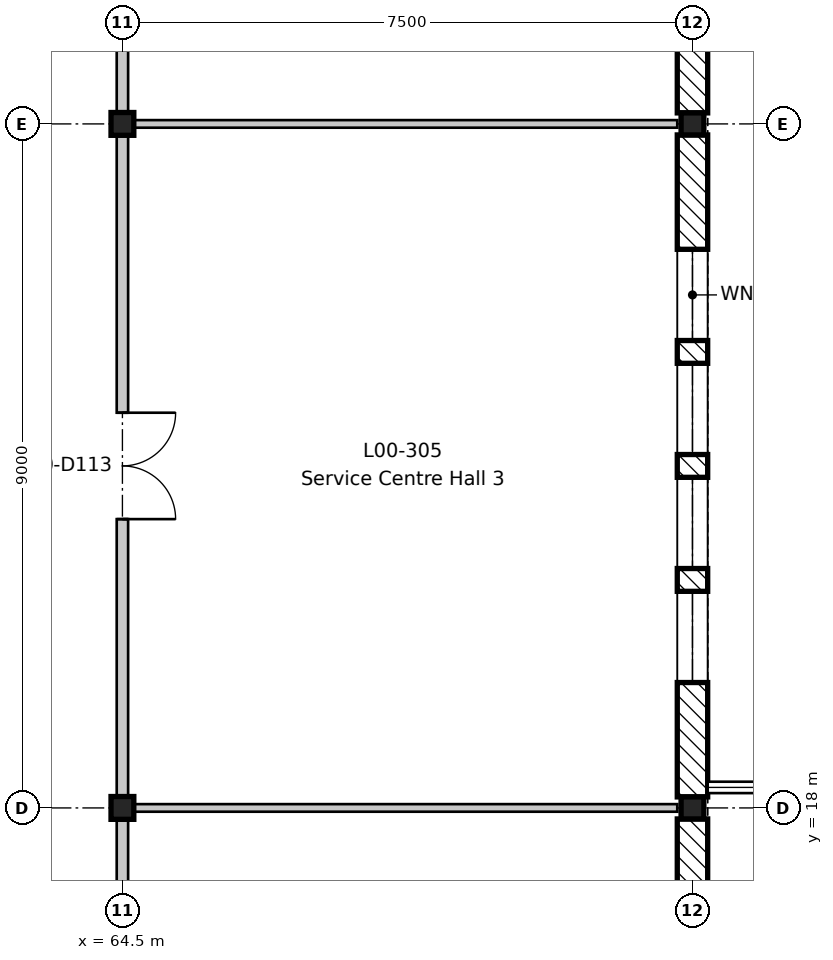
"""IFC4 building model, lengths in metres.
Left out: names, types, materials, properties, quantities, classifications, styles, units other than length and angle.
Written with IfcOpenShell. Run it as: python <this file> out.ifc"""

import sys

from ifc_helpers import new_model, si_unit, direction, frame, frame_2d, origin, origin_2d, place, context, subcontext, project, spatial, rectangle, i_section, extrude, element, fill, save


model = new_model("IFC4")
c1 = context("Model", 3, precision=1e-05, world=origin(), true_north=direction((0.0, 1.0)))
c2 = subcontext(c1, "Body", "Model", "MODEL_VIEW")
j1 = project(units=[si_unit("LENGTHUNIT", "METRE"), si_unit("PLANEANGLEUNIT", "RADIAN")], contexts=[c1])
p1 = place(None, origin())
s1 = spatial("IfcSite", under=j1, at=p1, CompositionType="ELEMENT")
p2 = place(p1, origin())
s2 = spatial("IfcBuilding", under=s1, at=p2, CompositionType="ELEMENT")
p3 = place(p2, origin())
s3 = spatial("IfcBuildingStorey", under=s2, at=p3, CompositionType="ELEMENT", Elevation=0.0)
for number, where, z_axis, x_axis in (
    (1, (64.5, 18.0, -0.6), (0.0, 0.0, 1.0), (1.0, 0.0, 0.0)),
    (2, (64.5, 27.0, -0.6), (0.0, 0.0, 1.0), (1.0, 0.0, 0.0)),
):
    element("IfcColumn", number, at=place(p3, frame(where, z_axis=z_axis, x_axis=x_axis)), inside=s3, PredefinedType="COLUMN", context=c2, shape_type="SweptSolid", body=[
        extrude(i_section(OverallWidth=0.3, OverallDepth=0.3, WebThickness=0.011, FlangeThickness=0.019, FilletRadius=0.027, at=origin_2d()), origin(), (0.0, 0.0, 1.0), 5.8),
    ])
for number, where, z_axis, x_axis in (
    (3, (72.0, 18.0, -0.6), (0.0, 0.0, 1.0), (1.0, 0.0, 0.0)),
    (4, (72.0, 27.0, -0.6), (0.0, 0.0, 1.0), (1.0, 0.0, 0.0)),
):
    element("IfcColumn", number, at=place(p3, frame(where, z_axis=z_axis, x_axis=x_axis)), inside=s3, PredefinedType="COLUMN", context=c2, shape_type="SweptSolid", body=[
        extrude(i_section(OverallWidth=0.3, OverallDepth=0.29, WebThickness=0.009, FlangeThickness=0.014, FilletRadius=0.027, at=origin_2d()), origin(), (0.0, 0.0, 1.0), 5.8),
    ])
p4 = place(p3, frame((72.0, 17.855, 0.0), z_axis=(0.0, 0.0, 1.0), x_axis=(0.0, -1.0, 0.0)))
e5 = element("IfcWall", 5, at=p4, inside=s3, PredefinedType="STANDARD", context=c2, shape_type="SweptSolid", body=[
    extrude(rectangle(XDim=8.71, YDim=0.4, at=frame_2d((4.355, 0.0))), origin(), (0.0, 0.0, 1.0), 4.8),
])
p5 = place(p4, frame((6.005, 0.0, 0.6)))
e6 = element("IfcOpeningElement", 6, at=p5, cuts=e5, PredefinedType="OPENING", context=c2, shape_type="SweptSolid", body=[
    extrude(rectangle(XDim=1.2, YDim=3.9, at=frame_2d((0.6, 1.95))), frame((0.0, 0.21, 0.0), z_axis=(0.0, -1.0, 0.0), x_axis=(1.0, 0.0, 0.0)), (0.0, 0.0, 1.0), 0.42),
])
p6 = place(p4, frame((4.505, 0.0, 0.6)))
e7 = element("IfcOpeningElement", 7, at=p6, cuts=e5, PredefinedType="OPENING", context=c2, shape_type="SweptSolid", body=[
    extrude(rectangle(XDim=1.2, YDim=3.9, at=frame_2d((0.6, 1.95))), frame((0.0, 0.21, 0.0), z_axis=(0.0, -1.0, 0.0), x_axis=(1.0, 0.0, 0.0)), (0.0, 0.0, 1.0), 0.42),
])
p7 = place(p4, frame((3.005, 0.0, 0.6)))
e8 = element("IfcOpeningElement", 8, at=p7, cuts=e5, PredefinedType="OPENING", context=c2, shape_type="SweptSolid", body=[
    extrude(rectangle(XDim=1.2, YDim=3.9, at=frame_2d((0.6, 1.95))), frame((0.0, 0.21, 0.0), z_axis=(0.0, -1.0, 0.0), x_axis=(1.0, 0.0, 0.0)), (0.0, 0.0, 1.0), 0.42),
])
p8 = place(p4, frame((1.505, 0.0, 0.6)))
e9 = element("IfcOpeningElement", 9, at=p8, cuts=e5, PredefinedType="OPENING", context=c2, shape_type="SweptSolid", body=[
    extrude(rectangle(XDim=1.2, YDim=3.9, at=frame_2d((0.6, 1.95))), frame((0.0, 0.21, 0.0), z_axis=(0.0, -1.0, 0.0), x_axis=(1.0, 0.0, 0.0)), (0.0, 0.0, 1.0), 0.42),
])
p9 = place(p3, frame((72.0, 26.855, 0.0), z_axis=(0.0, 0.0, 1.0), x_axis=(0.0, -1.0, 0.0)))
e10 = element("IfcWall", 10, at=p9, inside=s3, PredefinedType="STANDARD", context=c2, shape_type="SweptSolid", body=[
    extrude(rectangle(XDim=8.71, YDim=0.4, at=frame_2d((4.355, 0.0))), origin(), (0.0, 0.0, 1.0), 4.8),
])
p10 = place(p9, frame((6.005, 0.0, 0.6)))
e11 = element("IfcOpeningElement", 11, at=p10, cuts=e10, PredefinedType="OPENING", context=c2, shape_type="SweptSolid", body=[
    extrude(rectangle(XDim=1.2, YDim=3.9, at=frame_2d((0.6, 1.95))), frame((0.0, 0.21, 0.0), z_axis=(0.0, -1.0, 0.0), x_axis=(1.0, 0.0, 0.0)), (0.0, 0.0, 1.0), 0.42),
])
p11 = place(p9, frame((4.505, 0.0, 0.6)))
e12 = element("IfcOpeningElement", 12, at=p11, cuts=e10, PredefinedType="OPENING", context=c2, shape_type="SweptSolid", body=[
    extrude(rectangle(XDim=1.2, YDim=3.9, at=frame_2d((0.6, 1.95))), frame((0.0, 0.21, 0.0), z_axis=(0.0, -1.0, 0.0), x_axis=(1.0, 0.0, 0.0)), (0.0, 0.0, 1.0), 0.42),
])
p12 = place(p9, frame((3.005, 0.0, 0.6)))
e13 = element("IfcOpeningElement", 13, at=p12, cuts=e10, PredefinedType="OPENING", context=c2, shape_type="SweptSolid", body=[
    extrude(rectangle(XDim=1.2, YDim=3.9, at=frame_2d((0.6, 1.95))), frame((0.0, 0.21, 0.0), z_axis=(0.0, -1.0, 0.0), x_axis=(1.0, 0.0, 0.0)), (0.0, 0.0, 1.0), 0.42),
])
p13 = place(p9, frame((1.505, 0.0, 0.6)))
e14 = element("IfcOpeningElement", 14, at=p13, cuts=e10, PredefinedType="OPENING", context=c2, shape_type="SweptSolid", body=[
    extrude(rectangle(XDim=1.2, YDim=3.9, at=frame_2d((0.6, 1.95))), frame((0.0, 0.21, 0.0), z_axis=(0.0, -1.0, 0.0), x_axis=(1.0, 0.0, 0.0)), (0.0, 0.0, 1.0), 0.42),
])
p14 = place(p3, frame((72.0, 35.855, 0.0), z_axis=(0.0, 0.0, 1.0), x_axis=(0.0, -1.0, 0.0)))
e15 = element("IfcWall", 15, at=p14, inside=s3, PredefinedType="STANDARD", context=c2, shape_type="SweptSolid", body=[
    extrude(rectangle(XDim=8.71, YDim=0.4, at=frame_2d((4.355, 0.0))), origin(), (0.0, 0.0, 1.0), 4.8),
])
p15 = place(p14, frame((6.005, 0.0, 0.6)))
e16 = element("IfcOpeningElement", 16, at=p15, cuts=e15, PredefinedType="OPENING", context=c2, shape_type="SweptSolid", body=[
    extrude(rectangle(XDim=1.2, YDim=3.9, at=frame_2d((0.6, 1.95))), frame((0.0, 0.21, 0.0), z_axis=(0.0, -1.0, 0.0), x_axis=(1.0, 0.0, 0.0)), (0.0, 0.0, 1.0), 0.42),
])
p16 = place(p14, frame((4.505, 0.0, 0.6)))
e17 = element("IfcOpeningElement", 17, at=p16, cuts=e15, PredefinedType="OPENING", context=c2, shape_type="SweptSolid", body=[
    extrude(rectangle(XDim=1.2, YDim=3.9, at=frame_2d((0.6, 1.95))), frame((0.0, 0.21, 0.0), z_axis=(0.0, -1.0, 0.0), x_axis=(1.0, 0.0, 0.0)), (0.0, 0.0, 1.0), 0.42),
])
p17 = place(p14, frame((3.005, 0.0, 0.6)))
e18 = element("IfcOpeningElement", 18, at=p17, cuts=e15, PredefinedType="OPENING", context=c2, shape_type="SweptSolid", body=[
    extrude(rectangle(XDim=1.2, YDim=3.9, at=frame_2d((0.6, 1.95))), frame((0.0, 0.21, 0.0), z_axis=(0.0, -1.0, 0.0), x_axis=(1.0, 0.0, 0.0)), (0.0, 0.0, 1.0), 0.42),
])
p18 = place(p14, frame((1.505, 0.0, 0.6)))
e19 = element("IfcOpeningElement", 19, at=p18, cuts=e15, PredefinedType="OPENING", context=c2, shape_type="SweptSolid", body=[
    extrude(rectangle(XDim=1.2, YDim=3.9, at=frame_2d((0.6, 1.95))), frame((0.0, 0.21, 0.0), z_axis=(0.0, -1.0, 0.0), x_axis=(1.0, 0.0, 0.0)), (0.0, 0.0, 1.0), 0.42),
])
for number, where, z_axis, x_axis in (
    (20, (64.575, 18.0, 0.0), (0.0, 0.0, 1.0), (1.0, 0.0, 0.0)),
    (21, (64.575, 27.0, 0.0), (0.0, 0.0, 1.0), (1.0, 0.0, 0.0)),
):
    element("IfcWall", number, at=place(p3, frame(where, z_axis=z_axis, x_axis=x_axis)), inside=s3, PredefinedType="PARTITIONING", context=c2, shape_type="SweptSolid", body=[
        extrude(rectangle(XDim=7.225, YDim=0.1, at=frame_2d((3.613, 0.0))), origin(), (0.0, 0.0, 1.0), 4.85),
    ])
p19 = place(p3, frame((64.5, 9.0, 0.0), z_axis=(0.0, 0.0, 1.0), x_axis=(0.0, 1.0, 0.0)))
e22 = element("IfcWall", 22, at=p19, inside=s3, PredefinedType="PARTITIONING", context=c2, shape_type="SweptSolid", body=[
    extrude(rectangle(XDim=44.8, YDim=0.15, at=frame_2d((22.4, 0.0))), origin(), (0.0, 0.0, 1.0), 4.68),
])
p20 = place(p19, frame((3.8, 0.0, 0.0)))
e23 = element("IfcOpeningElement", 23, at=p20, cuts=e22, PredefinedType="OPENING", context=c2, shape_type="SweptSolid", body=[
    extrude(rectangle(XDim=1.4, YDim=2.1, at=frame_2d((0.7, 1.05))), frame((0.0, 0.085, 0.0), z_axis=(0.0, -1.0, 0.0), x_axis=(1.0, 0.0, 0.0)), (0.0, 0.0, 1.0), 0.17),
])
p21 = place(p19, frame((12.8, 0.0, 0.0)))
e24 = element("IfcOpeningElement", 24, at=p21, cuts=e22, PredefinedType="OPENING", context=c2, shape_type="SweptSolid", body=[
    extrude(rectangle(XDim=1.4, YDim=2.1, at=frame_2d((0.7, 1.05))), frame((0.0, 0.085, 0.0), z_axis=(0.0, -1.0, 0.0), x_axis=(1.0, 0.0, 0.0)), (0.0, 0.0, 1.0), 0.17),
])
p22 = place(p19, frame((21.8, 0.0, 0.0)))
e25 = element("IfcOpeningElement", 25, at=p22, cuts=e22, PredefinedType="OPENING", context=c2, shape_type="SweptSolid", body=[
    extrude(rectangle(XDim=1.4, YDim=2.1, at=frame_2d((0.7, 1.05))), frame((0.0, 0.085, 0.0), z_axis=(0.0, -1.0, 0.0), x_axis=(1.0, 0.0, 0.0)), (0.0, 0.0, 1.0), 0.17),
])
p23 = place(p19, frame((30.8, 0.0, 0.0)))
e26 = element("IfcOpeningElement", 26, at=p23, cuts=e22, PredefinedType="OPENING", context=c2, shape_type="SweptSolid", body=[
    extrude(rectangle(XDim=1.4, YDim=2.1, at=frame_2d((0.7, 1.05))), frame((0.0, 0.085, 0.0), z_axis=(0.0, -1.0, 0.0), x_axis=(1.0, 0.0, 0.0)), (0.0, 0.0, 1.0), 0.17),
])
p24 = place(p19, frame((39.8, 0.0, 0.0)))
e27 = element("IfcOpeningElement", 27, at=p24, cuts=e22, PredefinedType="OPENING", context=c2, shape_type="SweptSolid", body=[
    extrude(rectangle(XDim=1.4, YDim=2.1, at=frame_2d((0.7, 1.05))), frame((0.0, 0.085, 0.0), z_axis=(0.0, -1.0, 0.0), x_axis=(1.0, 0.0, 0.0)), (0.0, 0.0, 1.0), 0.17),
])
p25 = place(p10, origin())
e28 = element("IfcWindow", 28, at=p25, inside=s3, PartitioningType="SINGLE_PANEL", PredefinedType="WINDOW", context=c2, shape_type="SweptSolid", body=[
    extrude(rectangle(XDim=1.2, YDim=3.9, at=frame_2d((0.6, 1.95))), frame((0.0, 0.03, 0.0), z_axis=(0.0, -1.0, 0.0), x_axis=(1.0, 0.0, 0.0)), (0.0, 0.0, 1.0), 0.06),
])
fill(e11, e28)
p26 = place(p11, origin())
e29 = element("IfcWindow", 29, at=p26, inside=s3, PartitioningType="SINGLE_PANEL", PredefinedType="WINDOW", context=c2, shape_type="SweptSolid", body=[
    extrude(rectangle(XDim=1.2, YDim=3.9, at=frame_2d((0.6, 1.95))), frame((0.0, 0.03, 0.0), z_axis=(0.0, -1.0, 0.0), x_axis=(1.0, 0.0, 0.0)), (0.0, 0.0, 1.0), 0.06),
])
fill(e12, e29)
p27 = place(p12, origin())
e30 = element("IfcWindow", 30, at=p27, inside=s3, PartitioningType="SINGLE_PANEL", PredefinedType="WINDOW", context=c2, shape_type="SweptSolid", body=[
    extrude(rectangle(XDim=1.2, YDim=3.9, at=frame_2d((0.6, 1.95))), frame((0.0, 0.03, 0.0), z_axis=(0.0, -1.0, 0.0), x_axis=(1.0, 0.0, 0.0)), (0.0, 0.0, 1.0), 0.06),
])
fill(e13, e30)
p28 = place(p13, origin())
e31 = element("IfcWindow", 31, at=p28, inside=s3, PartitioningType="SINGLE_PANEL", PredefinedType="WINDOW", context=c2, shape_type="SweptSolid", body=[
    extrude(rectangle(XDim=1.2, YDim=3.9, at=frame_2d((0.6, 1.95))), frame((0.0, 0.03, 0.0), z_axis=(0.0, -1.0, 0.0), x_axis=(1.0, 0.0, 0.0)), (0.0, 0.0, 1.0), 0.06),
])
fill(e14, e31)
p29 = place(p21, frame((1.4, 0.0, 0.0), z_axis=(0.0, 0.0, 1.0), x_axis=(-1.0, 0.0, 0.0)))
e32 = element("IfcDoor", 32, at=p29, inside=s3, OperationType="DOUBLE_DOOR_SINGLE_SWING", PredefinedType="DOOR", context=c2, shape_type="SweptSolid", body=[
    extrude(rectangle(XDim=1.4, YDim=2.1, at=frame_2d((0.7, 1.05))), frame((0.0, 0.025, 0.0), z_axis=(0.0, -1.0, 0.0), x_axis=(1.0, 0.0, 0.0)), (0.0, 0.0, 1.0), 0.05),
])
fill(e24, e32)
save(model, sys.argv[1])
